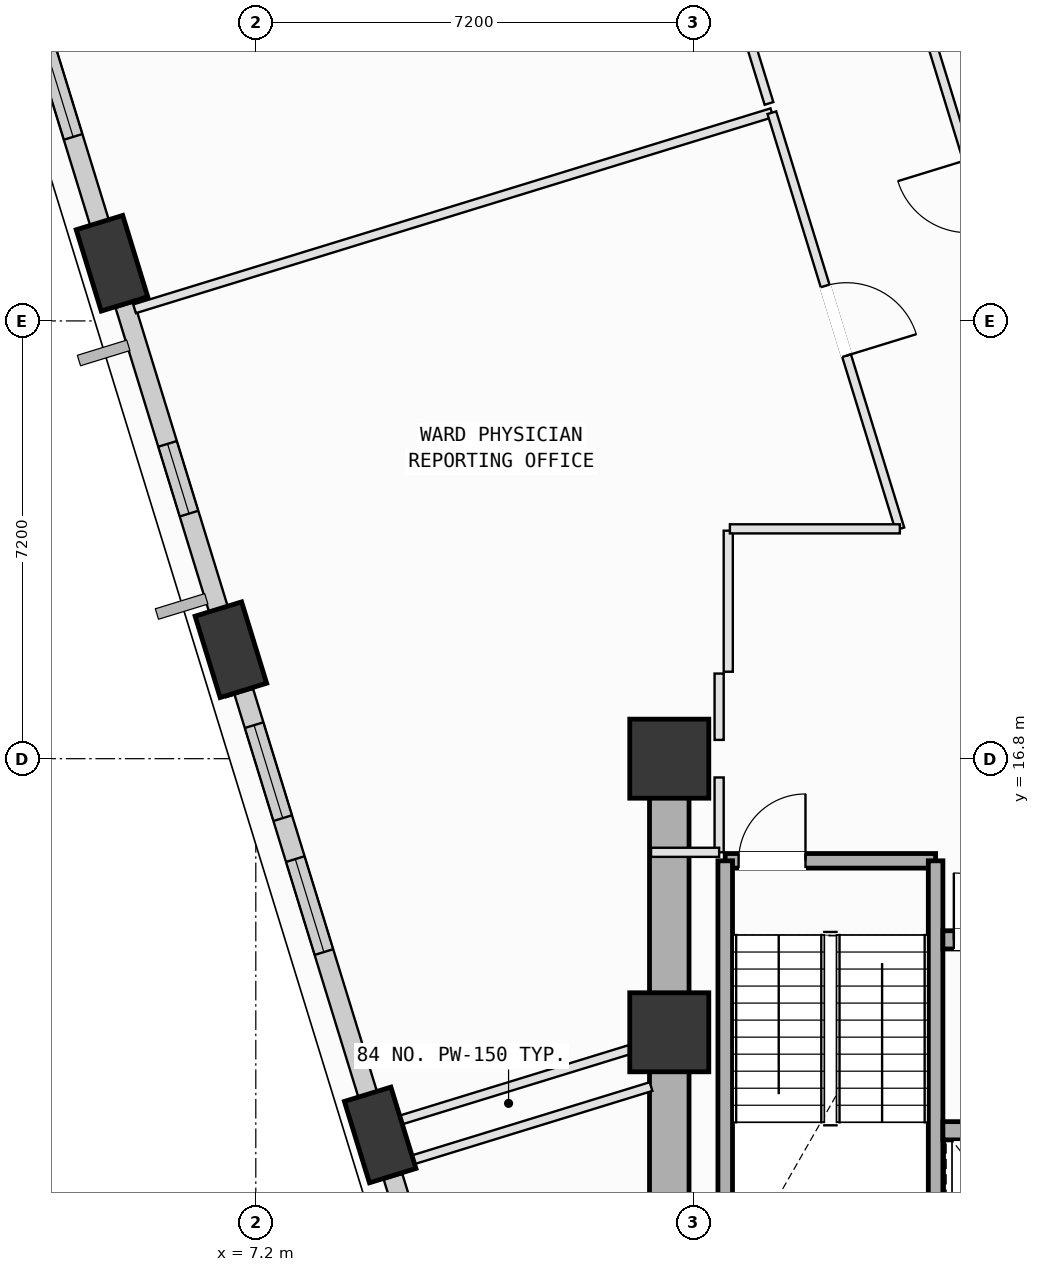
"""IFC4 building model, lengths in metres.
Left out: names, types, materials, properties, quantities, classifications, styles, units other than length and angle.
Written with IfcOpenShell. Run it as: python <this file> out.ifc"""

import sys

from ifc_helpers import new_model, si_unit, direction, frame, frame_2d, origin, origin_2d, place, context, subcontext, project, spatial, rectangle, extrude, element, fill, save


model = new_model("IFC4")
c1 = context("Model", 3, precision=1e-05, world=origin(), true_north=direction((0.0, 1.0)))
c2 = subcontext(c1, "Body", "Model", "MODEL_VIEW")
j1 = project(units=[si_unit("LENGTHUNIT", "METRE"), si_unit("PLANEANGLEUNIT", "RADIAN")], contexts=[c1])
p1 = place(None, origin())
s1 = spatial("IfcSite", under=j1, at=p1, CompositionType="ELEMENT")
p2 = place(p1, origin())
s2 = spatial("IfcBuilding", under=s1, at=p2, CompositionType="ELEMENT")
p3 = place(p2, frame((0.0, 0.0, 96.4)))
s3 = spatial("IfcBuildingStorey", under=s2, at=p3, CompositionType="ELEMENT", Elevation=96.4)
for number, where, z_axis, x_axis in (
    (1, (14.0, 12.3, 0.0), (0.0, 0.0, 1.0), (1.0, 0.0, 0.0)),
    (2, (14.0, 16.8, 0.0), (0.0, 0.0, 1.0), (1.0, 0.0, 0.0)),
):
    element("IfcColumn", number, at=place(p3, frame(where, z_axis=z_axis, x_axis=x_axis)), inside=s3, PredefinedType="COLUMN", context=c2, shape_type="SweptSolid", body=[
        extrude(rectangle(XDim=1.3, YDim=1.3, at=origin_2d()), origin(), (0.0, 0.0, 1.0), 4.0),
    ])
p4 = place(p3, frame((4.835, 24.948, 0.002), z_axis=(0.000363967728, -0.118410834105, 0.99296462268), x_axis=(-0.296956141617, 0.948160358694, 0.113176782761)))
e3 = element("IfcColumn", 3, at=p4, inside=s3, PredefinedType="COLUMN", context=c2, shape_type="SweptSolid", body=[
    extrude(rectangle(XDim=1.4, YDim=0.8, at=origin_2d()), origin(), (0.0, 0.0, 1.0), 4.025),
])
p5 = place(p3, frame((6.79, 18.592, 0.002), z_axis=(0.026524678267, -0.110226122959, 0.993552536739), x_axis=(-0.508055274423, 0.854480999744, 0.108360782605)))
e4 = element("IfcColumn", 4, at=p5, inside=s3, PredefinedType="COLUMN", context=c2, shape_type="SweptSolid", body=[
    extrude(rectangle(XDim=1.4, YDim=0.8, at=origin_2d()), origin(), (0.0, 0.0, 1.0), 4.022),
])
p6 = place(p3, frame((9.245, 10.611, 0.002), z_axis=(0.059282777217, -0.099755256647, 0.993244401493), x_axis=(-0.737766845814, 0.665881934483, 0.110911363471)))
e5 = element("IfcColumn", 5, at=p6, inside=s3, PredefinedType="COLUMN", context=c2, shape_type="SweptSolid", body=[
    extrude(rectangle(XDim=1.4, YDim=0.8, at=origin_2d()), origin(), (0.0, 0.0, 1.0), 4.023),
])
p7 = place(p3, frame((4.757, 25.2, 0.0), z_axis=(0.0, 0.0, 1.0), x_axis=(-0.29404317004, 0.955792139617, 0.0)))
e6 = element("IfcWall", 6, at=p7, inside=s3, PredefinedType="SOLIDWALL", context=c2, shape_type="SweptSolid", body=[
    extrude(rectangle(XDim=5.628, YDim=0.32, at=frame_2d((2.814, 0.0))), origin(), (0.0, 0.0, 1.0), 3.165),
])
p8 = place(p7, frame((1.911, 0.0, 0.75)))
e7 = element("IfcOpeningElement", 7, at=p8, cuts=e6, PredefinedType="OPENING", context=c2, shape_type="SweptSolid", body=[
    extrude(rectangle(XDim=1.8, YDim=2.05, at=frame_2d((0.9, 1.025))), frame((0.0, 0.17, 0.0), z_axis=(0.0, -1.0, 0.0), x_axis=(1.0, 0.0, 0.0)), (0.0, 0.0, 1.0), 0.34),
])
p9 = place(p3, frame((6.711, 18.849, 0.0), z_axis=(0.0, 0.0, 1.0), x_axis=(-0.294022219877, 0.955798584545, 0.0)))
e8 = element("IfcWall", 8, at=p9, inside=s3, PredefinedType="SOLIDWALL", context=c2, shape_type="SweptSolid", body=[
    extrude(rectangle(XDim=5.662, YDim=0.32, at=frame_2d((2.831, 0.0))), origin(), (0.0, 0.0, 1.0), 3.165),
])
p10 = place(p9, frame((2.073, 0.0, 0.75)))
e9 = element("IfcOpeningElement", 9, at=p10, cuts=e8, PredefinedType="OPENING", context=c2, shape_type="SweptSolid", body=[
    extrude(rectangle(XDim=1.2, YDim=1.75, at=frame_2d((0.6, 0.875))), frame((0.0, 0.17, 0.0), z_axis=(0.0, -1.0, 0.0), x_axis=(1.0, 0.0, 0.0)), (0.0, 0.0, 1.0), 0.34),
])
p11 = place(p3, frame((9.167, 10.866, 0.0), z_axis=(0.0, 0.0, 1.0), x_axis=(-0.294020583558, 0.955799087907, 0.0)))
e10 = element("IfcWall", 10, at=p11, inside=s3, PredefinedType="SOLIDWALL", context=c2, shape_type="SweptSolid", body=[
    extrude(rectangle(XDim=7.36, YDim=0.32, at=frame_2d((3.68, 0.0))), origin(), (0.0, 0.0, 1.0), 3.165),
])
p12 = place(p11, frame((2.881, 0.0, 0.75)))
e11 = element("IfcOpeningElement", 11, at=p12, cuts=e10, PredefinedType="OPENING", context=c2, shape_type="SweptSolid", body=[
    extrude(rectangle(XDim=1.6, YDim=1.95, at=frame_2d((0.8, 0.975))), frame((0.0, 0.17, 0.0), z_axis=(0.0, -1.0, 0.0), x_axis=(1.0, 0.0, 0.0)), (0.0, 0.0, 1.0), 0.34),
])
p13 = place(p11, frame((5.186, 0.0, 0.75)))
e12 = element("IfcOpeningElement", 12, at=p13, cuts=e10, PredefinedType="OPENING", context=c2, shape_type="SweptSolid", body=[
    extrude(rectangle(XDim=1.6, YDim=1.95, at=frame_2d((0.8, 0.975))), frame((0.0, 0.17, 0.0), z_axis=(0.0, -1.0, 0.0), x_axis=(1.0, 0.0, 0.0)), (0.0, 0.0, 1.0), 0.34),
])
p14 = place(p3, frame((11.287, 3.975, 0.0), z_axis=(0.0, 0.0, 1.0), x_axis=(-0.294052769951, 0.955789186214, 0.0)))
e13 = element("IfcWall", 13, at=p14, inside=s3, PredefinedType="SOLIDWALL", context=c2, shape_type="SweptSolid", body=[
    extrude(rectangle(XDim=6.224, YDim=0.32, at=frame_2d((3.112, 0.0))), origin(), (0.0, 0.0, 1.0), 3.165),
])
p15 = place(p14, frame((2.114, 0.0, 0.75)))
e14 = element("IfcOpeningElement", 14, at=p15, cuts=e13, PredefinedType="OPENING", context=c2, shape_type="SweptSolid", body=[
    extrude(rectangle(XDim=2.0, YDim=1.95, at=frame_2d((1.0, 0.975))), frame((0.0, 0.17, 0.0), z_axis=(0.0, -1.0, 0.0), x_axis=(1.0, 0.0, 0.0)), (0.0, 0.0, 1.0), 0.34),
])
p16 = place(p3, frame((14.92, 15.12, 0.0), z_axis=(0.0, 0.0, 1.0), x_axis=(1.0, 0.0, 0.0)))
e15 = element("IfcWall", 15, at=p16, inside=s3, PredefinedType="SOLIDWALL", context=c2, shape_type="SweptSolid", body=[
    extrude(rectangle(XDim=3.46, YDim=0.24, at=frame_2d((1.73, 0.0))), origin(), (0.0, 0.0, 1.0), 3.78),
])
p17 = place(p16, frame((0.22, 0.0, 0.0)))
e16 = element("IfcOpeningElement", 16, at=p17, cuts=e15, PredefinedType="OPENING", context=c2, shape_type="SweptSolid", body=[
    extrude(rectangle(XDim=1.1, YDim=2.15, at=frame_2d((0.55, 1.075))), frame((0.0, 0.13, 0.0), z_axis=(0.0, -1.0, 0.0), x_axis=(1.0, 0.0, 0.0)), (0.0, 0.0, 1.0), 0.26),
])
for number, where, z_axis, x_axis in (
    (17, (18.38, 15.12, 0.0), (0.0, 0.0, 1.0), (0.0, -1.0, 0.0)),
    (18, (14.92, 8.125, 0.0), (0.0, 0.0, 1.0), (0.0, 1.0, 0.0)),
):
    element("IfcWall", number, at=place(p3, frame(where, z_axis=z_axis, x_axis=x_axis)), inside=s3, PredefinedType="SOLIDWALL", context=c2, shape_type="SweptSolid", body=[
        extrude(rectangle(XDim=6.995, YDim=0.24, at=frame_2d((3.498, 0.0))), origin(), (0.0, 0.0, 1.0), 3.78),
    ])
p18 = place(p3, frame((14.0, 16.8, 0.0), z_axis=(0.0, 0.0, 1.0), x_axis=(0.0, -1.0, 0.0)))
e19 = element("IfcWall", 19, at=p18, inside=s3, PredefinedType="SHEAR", context=c2, shape_type="SweptSolid", body=[
    extrude(rectangle(XDim=9.0, YDim=0.65, at=frame_2d((4.5, 0.0))), origin(), (0.0, 0.0, 1.0), 3.78),
])
p19 = place(p3, frame((18.5, 10.68, 0.0), z_axis=(0.0, 0.0, 1.0), x_axis=(1.0, 0.0, 0.0)))
e20 = element("IfcWall", 20, at=p19, inside=s3, PredefinedType="SOLIDWALL", context=c2, shape_type="SweptSolid", body=[
    extrude(rectangle(XDim=5.3, YDim=0.3, at=frame_2d((2.65, 0.0))), origin(), (0.0, 0.0, 1.0), 3.78),
])
p20 = place(p19, frame((4.22, 0.0, 0.0)))
e21 = element("IfcOpeningElement", 21, at=p20, cuts=e20, PredefinedType="OPENING", context=c2, shape_type="SweptSolid", body=[
    extrude(rectangle(XDim=0.86, YDim=2.06, at=frame_2d((0.43, 1.03))), frame((0.0, 0.16, 0.0), z_axis=(0.0, -1.0, 0.0), x_axis=(1.0, 0.0, 0.0)), (0.0, 0.0, 1.0), 0.32),
])
p21 = place(p19, frame((0.425, 0.0, 0.0)))
e22 = element("IfcOpeningElement", 22, at=p21, cuts=e20, PredefinedType="OPENING", context=c2, shape_type="SweptSolid", body=[
    extrude(rectangle(XDim=1.25, YDim=2.18, at=frame_2d((0.625, 1.09))), frame((0.0, 0.16, 0.0), z_axis=(0.0, -1.0, 0.0), x_axis=(1.0, 0.0, 0.0)), (0.0, 0.0, 1.0), 0.32),
])
p22 = place(p19, frame((2.525, 0.0, 0.0)))
e23 = element("IfcOpeningElement", 23, at=p22, cuts=e20, PredefinedType="OPENING", context=c2, shape_type="SweptSolid", body=[
    extrude(rectangle(XDim=1.25, YDim=2.18, at=frame_2d((0.625, 1.09))), frame((0.0, 0.16, 0.0), z_axis=(0.0, -1.0, 0.0), x_axis=(1.0, 0.0, 0.0)), (0.0, 0.0, 1.0), 0.32),
])
p23 = place(p3, frame((18.5, 13.82, 0.0), z_axis=(0.0, 0.0, 1.0), x_axis=(1.0, 0.0, 0.0)))
e24 = element("IfcWall", 24, at=p23, inside=s3, PredefinedType="SOLIDWALL", context=c2, shape_type="SweptSolid", body=[
    extrude(rectangle(XDim=5.3, YDim=0.3, at=frame_2d((2.65, 0.0))), origin(), (0.0, 0.0, 1.0), 3.78),
])
p24 = place(p23, frame((0.18, 0.0, 0.0)))
e25 = element("IfcOpeningElement", 25, at=p24, cuts=e24, PredefinedType="OPENING", context=c2, shape_type="SweptSolid", body=[
    extrude(rectangle(XDim=1.1, YDim=2.15, at=frame_2d((0.55, 1.075))), frame((0.0, 0.16, 0.0), z_axis=(0.0, -1.0, 0.0), x_axis=(1.0, 0.0, 0.0)), (0.0, 0.0, 1.0), 0.32),
])
p25 = place(p3, frame((9.264, 10.042, 0.0), z_axis=(0.0, 0.0, 1.0), x_axis=(0.955775596646, 0.294096937856, 0.0)))
e26 = element("IfcWall", 26, at=p25, inside=s3, PredefinedType="PARTITIONING", context=c2, shape_type="SweptSolid", body=[
    extrude(rectangle(XDim=4.641, YDim=0.15, at=frame_2d((2.321, 0.0))), origin(), (0.0, 0.0, 1.0), 2.965),
])
p26 = place(p3, frame((14.97, 20.55, 0.0), z_axis=(0.0, 0.0, 1.0), x_axis=(0.0, -1.0, 0.0)))
e27 = element("IfcWall", 27, at=p26, inside=s3, PredefinedType="PARTITIONING", context=c2, shape_type="SweptSolid", body=[
    extrude(rectangle(XDim=2.32, YDim=0.15, at=frame_2d((1.16, 0.0))), origin(), (0.0, 0.0, 1.0), 2.965),
])
p27 = place(p3, frame((14.82, 18.2, 0.0), z_axis=(0.0, 0.0, 1.0), x_axis=(0.0, -1.0, 0.0)))
e28 = element("IfcWall", 28, at=p27, inside=s3, PredefinedType="PARTITIONING", context=c2, shape_type="SweptSolid", body=[
    extrude(rectangle(XDim=1.091, YDim=0.15, at=frame_2d((0.545, 0.0))), origin(), (0.0, 0.0, 1.0), 3.78),
])
p28 = place(p3, frame((14.82, 16.491, 0.0), z_axis=(0.0, 0.0, 1.0), x_axis=(0.0, -1.0, 0.0)))
e29 = element("IfcWall", 29, at=p28, inside=s3, PredefinedType="PARTITIONING", context=c2, shape_type="SweptSolid", body=[
    extrude(rectangle(XDim=1.231, YDim=0.15, at=frame_2d((0.615, 0.0))), origin(), (0.0, 0.0, 1.0), 3.78),
])
p29 = place(p3, frame((14.82, 15.26, 0.0), z_axis=(0.0, 0.0, 1.0), x_axis=(-1.0, 0.0, 0.0)))
e30 = element("IfcWall", 30, at=p29, inside=s3, PredefinedType="PARTITIONING", context=c2, shape_type="SweptSolid", body=[
    extrude(rectangle(XDim=1.12, YDim=0.15, at=frame_2d((0.56, 0.0))), origin(), (0.0, 0.0, 1.0), 3.78),
])
p30 = place(p3, frame((13.7, 12.123, 0.0), z_axis=(0.0, 0.0, 1.0), x_axis=(-0.955806131427, -0.29399768558, 0.0)))
e31 = element("IfcWall", 31, at=p30, inside=s3, PredefinedType="PARTITIONING", context=c2, shape_type="SweptSolid", body=[
    extrude(rectangle(XDim=4.67, YDim=0.15, at=frame_2d((2.335, 0.0))), origin(), (0.0, 0.0, 1.0), 2.965),
])
p31 = place(p3, frame((6.783, 17.833, 0.0), z_axis=(0.0, 0.0, 1.0), x_axis=(-0.29436255807, 0.955693823568, 0.0)))
e32 = element("IfcWall", 32, at=p31, inside=s3, PredefinedType="PARTITIONING", context=c2, shape_type="SweptSolid", body=[
    extrude(rectangle(XDim=0.992, YDim=0.15, at=frame_2d((0.496, 0.0))), origin(), (0.0, 0.0, 1.0), 3.165),
])
p32 = place(p3, frame((5.206, 24.199, 0.0), z_axis=(0.0, 0.0, 1.0), x_axis=(0.955774194853, 0.294101493455, 0.0)))
e33 = element("IfcWall", 33, at=p32, inside=s3, PredefinedType="PARTITIONING", context=c2, shape_type="SweptSolid", body=[
    extrude(rectangle(XDim=10.966, YDim=0.15, at=frame_2d((5.483, 0.0))), origin(), (0.0, 0.0, 1.0), 3.78),
])
p33 = place(p3, frame((15.687, 27.424, 0.0), z_axis=(0.0, 0.0, 1.0), x_axis=(0.293975633895, -0.955812914056, 0.0)))
e34 = element("IfcWall", 34, at=p33, inside=s3, PredefinedType="PARTITIONING", context=c2, shape_type="SweptSolid", body=[
    extrude(rectangle(XDim=7.16, YDim=0.15, at=frame_2d((3.58, 0.0))), origin(), (0.0, 0.0, 1.0), 3.78),
])
p34 = place(p33, frame((2.98, 0.0, 0.0)))
e35 = element("IfcOpeningElement", 35, at=p34, cuts=e34, PredefinedType="OPENING", context=c2, shape_type="SweptSolid", body=[
    extrude(rectangle(XDim=1.2, YDim=2.15, at=frame_2d((0.6, 1.075))), frame((0.0, 0.085, 0.0), z_axis=(0.0, -1.0, 0.0), x_axis=(1.0, 0.0, 0.0)), (0.0, 0.0, 1.0), 0.17),
])
p35 = place(p3, frame((17.792, 20.58, 0.0), z_axis=(0.0, 0.0, 1.0), x_axis=(-1.0, 0.0, 0.0)))
e36 = element("IfcWall", 36, at=p35, inside=s3, PredefinedType="PARTITIONING", context=c2, shape_type="SweptSolid", body=[
    extrude(rectangle(XDim=2.795, YDim=0.15, at=frame_2d((1.397, 0.0))), origin(), (0.0, 0.0, 1.0), 3.78),
])
p36 = place(p3, frame((12.217, 38.702, 0.0), z_axis=(0.0, 0.0, 1.0), x_axis=(0.294068161841, -0.955784450696, 0.0)))
e37 = element("IfcWall", 37, at=p36, inside=s3, PredefinedType="PARTITIONING", context=c2, shape_type="SweptSolid", body=[
    extrude(rectangle(XDim=11.64, YDim=0.15, at=frame_2d((5.82, 0.0))), origin(), (0.0, 0.0, 1.0), 3.78),
])
p37 = place(p36, frame((5.22, 0.0, 0.0)))
e38 = element("IfcOpeningElement", 38, at=p37, cuts=e37, PredefinedType="OPENING", context=c2, shape_type="SweptSolid", body=[
    extrude(rectangle(XDim=1.2, YDim=2.15, at=frame_2d((0.6, 1.075))), frame((0.0, 0.085, 0.0), z_axis=(0.0, -1.0, 0.0), x_axis=(1.0, 0.0, 0.0)), (0.0, 0.0, 1.0), 0.17),
])
p38 = place(p3, frame((4.81, 24.245, 0.0), z_axis=(0.0, 0.0, 1.0), x_axis=(-0.294122821945, 0.955767631598, 0.0)))
e39 = element("IfcWall", 39, at=p38, inside=s3, PredefinedType="PARTITIONING", context=c2, shape_type="SweptSolid", body=[
    extrude(rectangle(XDim=0.928, YDim=0.15, at=frame_2d((0.464, 0.0))), origin(), (0.0, 0.0, 1.0), 3.165),
])
p39 = place(p3, frame((20.032, 22.991, 0.0), z_axis=(0.0, 0.0, 1.0), x_axis=(-0.293974298693, 0.955813324718, 0.0)))
e40 = element("IfcWall", 40, at=p39, inside=s3, PredefinedType="PARTITIONING", context=c2, shape_type="SweptSolid", body=[
    extrude(rectangle(XDim=6.459, YDim=0.15, at=frame_2d((3.23, 0.0))), origin(), (0.0, 0.0, 1.0), 3.78),
])
p40 = place(p39, frame((2.63, 0.0, 0.0)))
e41 = element("IfcOpeningElement", 41, at=p40, cuts=e40, PredefinedType="OPENING", context=c2, shape_type="SweptSolid", body=[
    extrude(rectangle(XDim=1.2, YDim=2.15, at=frame_2d((0.6, 1.075))), frame((0.0, 0.085, 0.0), z_axis=(0.0, -1.0, 0.0), x_axis=(1.0, 0.0, 0.0)), (0.0, 0.0, 1.0), 0.17),
])
p41 = place(p8, origin())
e42 = element("IfcWindow", 42, at=p41, inside=s3, PartitioningType="SINGLE_PANEL", PredefinedType="WINDOW", context=c2, shape_type="SweptSolid", body=[
    extrude(rectangle(XDim=1.8, YDim=2.05, at=frame_2d((0.9, 1.025))), frame((0.0, 0.03, 0.0), z_axis=(0.0, -1.0, 0.0), x_axis=(1.0, 0.0, 0.0)), (0.0, 0.0, 1.0), 0.06),
])
fill(e7, e42)
p42 = place(p10, origin())
e43 = element("IfcWindow", 43, at=p42, inside=s3, PartitioningType="SINGLE_PANEL", PredefinedType="WINDOW", context=c2, shape_type="SweptSolid", body=[
    extrude(rectangle(XDim=1.2, YDim=1.75, at=frame_2d((0.6, 0.875))), frame((0.0, 0.03, 0.0), z_axis=(0.0, -1.0, 0.0), x_axis=(1.0, 0.0, 0.0)), (0.0, 0.0, 1.0), 0.06),
])
fill(e9, e43)
p43 = place(p12, origin())
e44 = element("IfcWindow", 44, at=p43, inside=s3, PartitioningType="SINGLE_PANEL", PredefinedType="WINDOW", context=c2, shape_type="SweptSolid", body=[
    extrude(rectangle(XDim=1.6, YDim=1.95, at=frame_2d((0.8, 0.975))), frame((0.0, 0.03, 0.0), z_axis=(0.0, -1.0, 0.0), x_axis=(1.0, 0.0, 0.0)), (0.0, 0.0, 1.0), 0.06),
])
fill(e11, e44)
p44 = place(p13, origin())
e45 = element("IfcWindow", 45, at=p44, inside=s3, PartitioningType="SINGLE_PANEL", PredefinedType="WINDOW", context=c2, shape_type="SweptSolid", body=[
    extrude(rectangle(XDim=1.6, YDim=1.95, at=frame_2d((0.8, 0.975))), frame((0.0, 0.03, 0.0), z_axis=(0.0, -1.0, 0.0), x_axis=(1.0, 0.0, 0.0)), (0.0, 0.0, 1.0), 0.06),
])
fill(e12, e45)
p45 = place(p17, origin())
e46 = element("IfcDoor", 46, at=p45, inside=s3, OperationType="SINGLE_SWING_RIGHT", PredefinedType="DOOR", context=c2, shape_type="SweptSolid", body=[
    extrude(rectangle(XDim=1.1, YDim=2.15, at=frame_2d((0.55, 1.075))), frame((0.0, 0.025, 0.0), z_axis=(0.0, -1.0, 0.0), x_axis=(1.0, 0.0, 0.0)), (0.0, 0.0, 1.0), 0.05),
])
fill(e16, e46)
p46 = place(p24, origin())
e47 = element("IfcDoor", 47, at=p46, inside=s3, OperationType="SINGLE_SWING_LEFT", PredefinedType="DOOR", context=c2, shape_type="SweptSolid", body=[
    extrude(rectangle(XDim=1.1, YDim=2.15, at=frame_2d((0.55, 1.075))), frame((0.0, 0.025, 0.0), z_axis=(0.0, -1.0, 0.0), x_axis=(1.0, 0.0, 0.0)), (0.0, 0.0, 1.0), 0.05),
])
fill(e25, e47)
p47 = place(p34, origin())
e48 = element("IfcDoor", 48, at=p47, inside=s3, OperationType="SINGLE_SWING_RIGHT", PredefinedType="DOOR", context=c2, shape_type="SweptSolid", body=[
    extrude(rectangle(XDim=1.2, YDim=2.15, at=frame_2d((0.6, 1.075))), frame((0.0, 0.025, 0.0), z_axis=(0.0, -1.0, 0.0), x_axis=(1.0, 0.0, 0.0)), (0.0, 0.0, 1.0), 0.05),
])
fill(e35, e48)
save(model, sys.argv[1])
